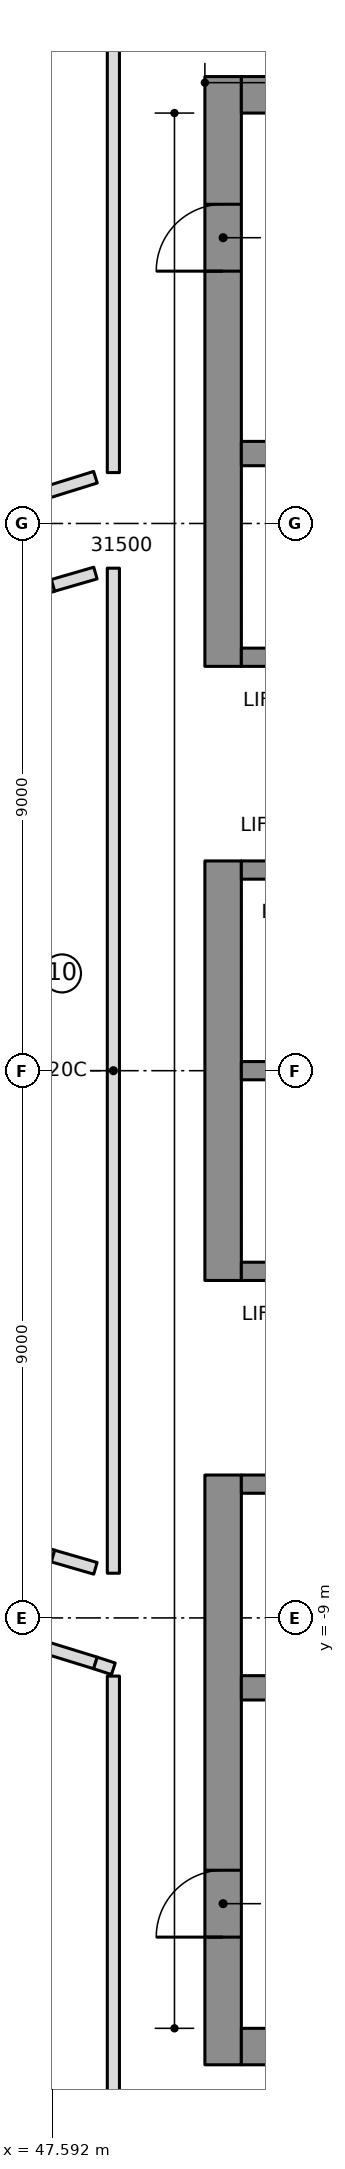
"""IFC4 building model, lengths in metres.
Left out: names, types, materials, properties, quantities, classifications, styles, units other than length and angle.
Written with IfcOpenShell. Run it as: python <this file> out.ifc"""

import sys

from ifc_helpers import new_model, si_unit, direction, frame, frame_2d, origin, place, context, subcontext, project, spatial, rectangle, extrude, element, fill, save


model = new_model("IFC4")
c1 = context("Model", 3, precision=1e-05, world=origin(), true_north=direction((0.0, 1.0)))
c2 = subcontext(c1, "Body", "Model", "MODEL_VIEW")
j1 = project(units=[si_unit("LENGTHUNIT", "METRE"), si_unit("PLANEANGLEUNIT", "RADIAN")], contexts=[c1])
p1 = place(None, origin())
s1 = spatial("IfcSite", under=j1, at=p1, CompositionType="ELEMENT")
p2 = place(p1, origin())
s2 = spatial("IfcBuilding", under=s1, at=p2, CompositionType="ELEMENT")
p3 = place(p2, frame((0.0, 0.0, 227.9)))
s3 = spatial("IfcBuildingStorey", under=s2, at=p3, CompositionType="ELEMENT", Elevation=227.9)
p4 = place(p3, frame((50.4, 6.65, 0.0), z_axis=(0.0, 0.0, 1.0), x_axis=(0.0, 1.0, 0.0)))
e1 = element("IfcWall", 1, at=p4, inside=s3, PredefinedType="SHEAR", context=c2, shape_type="SweptSolid", body=[
    extrude(rectangle(XDim=9.7, YDim=0.6, at=frame_2d((4.85, 0.0))), origin(), (0.0, 0.0, 1.0), 3.55),
])
p5 = place(p4, frame((6.5, 0.0, 0.0)))
e2 = element("IfcOpeningElement", 2, at=p5, cuts=e1, PredefinedType="OPENING", context=c2, shape_type="SweptSolid", body=[
    extrude(rectangle(XDim=1.1, YDim=2.1, at=frame_2d((0.55, 1.05))), frame((0.0, 0.31, 0.0), z_axis=(0.0, -1.0, 0.0), x_axis=(1.0, 0.0, 0.0)), (0.0, 0.0, 1.0), 0.62),
])
p6 = place(p3, frame((50.4, -3.45, 0.0), z_axis=(0.0, 0.0, 1.0), x_axis=(0.0, 1.0, 0.0)))
e3 = element("IfcWall", 3, at=p6, inside=s3, PredefinedType="SHEAR", context=c2, shape_type="SweptSolid", body=[
    extrude(rectangle(XDim=6.9, YDim=0.6, at=frame_2d((3.45, 0.0))), origin(), (0.0, 0.0, 1.0), 3.55),
])
p7 = place(p3, frame((50.4, -16.35, 0.0), z_axis=(0.0, 0.0, 1.0), x_axis=(0.0, 1.0, 0.0)))
e4 = element("IfcWall", 4, at=p7, inside=s3, PredefinedType="SHEAR", context=c2, shape_type="SweptSolid", body=[
    extrude(rectangle(XDim=9.7, YDim=0.6, at=frame_2d((4.85, 0.0))), origin(), (0.0, 0.0, 1.0), 3.55),
])
p8 = place(p7, frame((2.1, 0.0, 0.0)))
e5 = element("IfcOpeningElement", 5, at=p8, cuts=e4, PredefinedType="OPENING", context=c2, shape_type="SweptSolid", body=[
    extrude(rectangle(XDim=1.1, YDim=2.1, at=frame_2d((0.55, 1.05))), frame((0.0, 0.31, 0.0), z_axis=(0.0, -1.0, 0.0), x_axis=(1.0, 0.0, 0.0)), (0.0, 0.0, 1.0), 0.62),
])
for number, where, z_axis, x_axis in (
    (6, (50.7, 16.05, 0.0), (0.0, 0.0, 1.0), (1.0, 0.0, 0.0)),
    (7, (50.7, -16.05, 0.0), (0.0, 0.0, 1.0), (1.0, 0.0, 0.0)),
):
    element("IfcWall", number, at=place(p3, frame(where, z_axis=z_axis, x_axis=x_axis)), inside=s3, PredefinedType="SHEAR", context=c2, shape_type="SweptSolid", body=[
        extrude(rectangle(XDim=13.62, YDim=0.6, at=frame_2d((6.81, 0.0))), origin(), (0.0, 0.0, 1.0), 3.55),
    ])
p9 = place(p3, frame((50.7, 10.15, 0.0), z_axis=(0.0, 0.0, 1.0), x_axis=(1.0, 0.0, 0.0)))
e8 = element("IfcWall", 8, at=p9, inside=s3, PredefinedType="SHEAR", context=c2, shape_type="SweptSolid", body=[
    extrude(rectangle(XDim=13.02, YDim=0.4, at=frame_2d((6.51, 0.0))), origin(), (0.0, 0.0, 1.0), 3.55),
])
p10 = place(p9, frame((0.7, 0.0, 0.0)))
e9 = element("IfcOpeningElement", 9, at=p10, cuts=e8, PredefinedType="OPENING", context=c2, shape_type="SweptSolid", body=[
    extrude(rectangle(XDim=1.1, YDim=2.1, at=frame_2d((0.55, 1.05))), frame((0.0, 0.21, 0.0), z_axis=(0.0, -1.0, 0.0), x_axis=(1.0, 0.0, 0.0)), (0.0, 0.0, 1.0), 0.42),
])
p11 = place(p9, frame((3.5, 0.0, 0.0)))
e10 = element("IfcOpeningElement", 10, at=p11, cuts=e8, PredefinedType="OPENING", context=c2, shape_type="SweptSolid", body=[
    extrude(rectangle(XDim=1.1, YDim=2.1, at=frame_2d((0.55, 1.05))), frame((0.0, 0.21, 0.0), z_axis=(0.0, -1.0, 0.0), x_axis=(1.0, 0.0, 0.0)), (0.0, 0.0, 1.0), 0.42),
])
p12 = place(p3, frame((50.7, -10.15, 0.0), z_axis=(0.0, 0.0, 1.0), x_axis=(1.0, 0.0, 0.0)))
e11 = element("IfcWall", 11, at=p12, inside=s3, PredefinedType="SHEAR", context=c2, shape_type="SweptSolid", body=[
    extrude(rectangle(XDim=13.02, YDim=0.4, at=frame_2d((6.51, 0.0))), origin(), (0.0, 0.0, 1.0), 3.55),
])
p13 = place(p3, frame((50.7, 0.0, 0.0), z_axis=(0.0, 0.0, 1.0), x_axis=(1.0, 0.0, 0.0)))
e12 = element("IfcWall", 12, at=p13, inside=s3, PredefinedType="SHEAR", context=c2, shape_type="SweptSolid", body=[
    extrude(rectangle(XDim=10.9, YDim=0.3, at=frame_2d((5.45, 0.0))), origin(), (0.0, 0.0, 1.0), 3.55),
])
p14 = place(p3, frame((50.7, 3.3, 0.0), z_axis=(0.0, 0.0, 1.0), x_axis=(1.0, 0.0, 0.0)))
e13 = element("IfcWall", 13, at=p14, inside=s3, PredefinedType="SHEAR", context=c2, shape_type="SweptSolid", body=[
    extrude(rectangle(XDim=10.9, YDim=0.3, at=frame_2d((5.45, 0.0))), origin(), (0.0, 0.0, 1.0), 3.55),
])
p15 = place(p14, frame((0.7, 0.0, 0.0)))
e14 = element("IfcOpeningElement", 14, at=p15, cuts=e13, PredefinedType="OPENING", context=c2, shape_type="SweptSolid", body=[
    extrude(rectangle(XDim=1.1, YDim=2.1, at=frame_2d((0.55, 1.05))), frame((0.0, 0.16, 0.0), z_axis=(0.0, -1.0, 0.0), x_axis=(1.0, 0.0, 0.0)), (0.0, 0.0, 1.0), 0.32),
])
p16 = place(p14, frame((3.5, 0.0, 0.0)))
e15 = element("IfcOpeningElement", 15, at=p16, cuts=e13, PredefinedType="OPENING", context=c2, shape_type="SweptSolid", body=[
    extrude(rectangle(XDim=1.1, YDim=2.1, at=frame_2d((0.55, 1.05))), frame((0.0, 0.16, 0.0), z_axis=(0.0, -1.0, 0.0), x_axis=(1.0, 0.0, 0.0)), (0.0, 0.0, 1.0), 0.32),
])
p17 = place(p14, frame((6.4, 0.0, 0.0)))
e16 = element("IfcOpeningElement", 16, at=p17, cuts=e13, PredefinedType="OPENING", context=c2, shape_type="SweptSolid", body=[
    extrude(rectangle(XDim=0.9, YDim=2.1, at=frame_2d((0.45, 1.05))), frame((0.0, 0.16, 0.0), z_axis=(0.0, -1.0, 0.0), x_axis=(1.0, 0.0, 0.0)), (0.0, 0.0, 1.0), 0.32),
])
p18 = place(p14, frame((9.2, 0.0, 0.0)))
e17 = element("IfcOpeningElement", 17, at=p18, cuts=e13, PredefinedType="OPENING", context=c2, shape_type="SweptSolid", body=[
    extrude(rectangle(XDim=0.9, YDim=2.1, at=frame_2d((0.45, 1.05))), frame((0.0, 0.16, 0.0), z_axis=(0.0, -1.0, 0.0), x_axis=(1.0, 0.0, 0.0)), (0.0, 0.0, 1.0), 0.32),
])
p19 = place(p3, frame((50.7, 6.8, 0.0), z_axis=(0.0, 0.0, 1.0), x_axis=(1.0, 0.0, 0.0)))
e18 = element("IfcWall", 18, at=p19, inside=s3, PredefinedType="SHEAR", context=c2, shape_type="SweptSolid", body=[
    extrude(rectangle(XDim=10.9, YDim=0.3, at=frame_2d((5.45, 0.0))), origin(), (0.0, 0.0, 1.0), 3.55),
])
p20 = place(p19, frame((6.4, 0.0, 0.0)))
e19 = element("IfcOpeningElement", 19, at=p20, cuts=e18, PredefinedType="OPENING", context=c2, shape_type="SweptSolid", body=[
    extrude(rectangle(XDim=0.9, YDim=2.1, at=frame_2d((0.45, 1.05))), frame((0.0, 0.16, 0.0), z_axis=(0.0, -1.0, 0.0), x_axis=(1.0, 0.0, 0.0)), (0.0, 0.0, 1.0), 0.32),
])
p21 = place(p19, frame((9.2, 0.0, 0.0)))
e20 = element("IfcOpeningElement", 20, at=p21, cuts=e18, PredefinedType="OPENING", context=c2, shape_type="SweptSolid", body=[
    extrude(rectangle(XDim=0.9, YDim=2.1, at=frame_2d((0.45, 1.05))), frame((0.0, 0.16, 0.0), z_axis=(0.0, -1.0, 0.0), x_axis=(1.0, 0.0, 0.0)), (0.0, 0.0, 1.0), 0.32),
])
p22 = place(p3, frame((50.7, -3.3, 0.0), z_axis=(0.0, 0.0, 1.0), x_axis=(1.0, 0.0, 0.0)))
e21 = element("IfcWall", 21, at=p22, inside=s3, PredefinedType="SHEAR", context=c2, shape_type="SweptSolid", body=[
    extrude(rectangle(XDim=10.9, YDim=0.3, at=frame_2d((5.45, 0.0))), origin(), (0.0, 0.0, 1.0), 3.55),
])
p23 = place(p22, frame((9.1, 0.0, 0.0)))
e22 = element("IfcOpeningElement", 22, at=p23, cuts=e21, PredefinedType="OPENING", context=c2, shape_type="SweptSolid", body=[
    extrude(rectangle(XDim=1.1, YDim=2.1, at=frame_2d((0.55, 1.05))), frame((0.0, 0.16, 0.0), z_axis=(0.0, -1.0, 0.0), x_axis=(1.0, 0.0, 0.0)), (0.0, 0.0, 1.0), 0.32),
])
p24 = place(p3, frame((50.7, -6.8, 0.0), z_axis=(0.0, 0.0, 1.0), x_axis=(1.0, 0.0, 0.0)))
e23 = element("IfcWall", 23, at=p24, inside=s3, PredefinedType="SHEAR", context=c2, shape_type="SweptSolid", body=[
    extrude(rectangle(XDim=10.9, YDim=0.3, at=frame_2d((5.45, 0.0))), origin(), (0.0, 0.0, 1.0), 3.55),
])
p25 = place(p24, frame((6.3, 0.0, 0.0)))
e24 = element("IfcOpeningElement", 24, at=p25, cuts=e23, PredefinedType="OPENING", context=c2, shape_type="SweptSolid", body=[
    extrude(rectangle(XDim=1.1, YDim=2.1, at=frame_2d((0.55, 1.05))), frame((0.0, 0.16, 0.0), z_axis=(0.0, -1.0, 0.0), x_axis=(1.0, 0.0, 0.0)), (0.0, 0.0, 1.0), 0.32),
])
p26 = place(p24, frame((9.1, 0.0, 0.0)))
e25 = element("IfcOpeningElement", 25, at=p26, cuts=e23, PredefinedType="OPENING", context=c2, shape_type="SweptSolid", body=[
    extrude(rectangle(XDim=1.1, YDim=2.1, at=frame_2d((0.55, 1.05))), frame((0.0, 0.16, 0.0), z_axis=(0.0, -1.0, 0.0), x_axis=(1.0, 0.0, 0.0)), (0.0, 0.0, 1.0), 0.32),
])
p27 = place(p24, frame((0.8, 0.0, 0.0)))
e26 = element("IfcOpeningElement", 26, at=p27, cuts=e23, PredefinedType="OPENING", context=c2, shape_type="SweptSolid", body=[
    extrude(rectangle(XDim=0.9, YDim=2.1, at=frame_2d((0.45, 1.05))), frame((0.0, 0.16, 0.0), z_axis=(0.0, -1.0, 0.0), x_axis=(1.0, 0.0, 0.0)), (0.0, 0.0, 1.0), 0.32),
])
p28 = place(p24, frame((3.6, 0.0, 0.0)))
e27 = element("IfcOpeningElement", 27, at=p28, cuts=e23, PredefinedType="OPENING", context=c2, shape_type="SweptSolid", body=[
    extrude(rectangle(XDim=0.9, YDim=2.1, at=frame_2d((0.45, 1.05))), frame((0.0, 0.16, 0.0), z_axis=(0.0, -1.0, 0.0), x_axis=(1.0, 0.0, 0.0)), (0.0, 0.0, 1.0), 0.32),
])
for number, where, z_axis, x_axis in (
    (28, (46.85, 7.748, 0.0), (0.0, 0.0, 1.0), (0.955, 0.298, 0.0)),
    (29, (47.602, -7.982, 0.0), (0.0, 0.0, 1.0), (-0.955, 0.298, 0.0)),
):
    element("IfcWall", number, at=place(p3, frame(where, z_axis=z_axis, x_axis=x_axis)), inside=s3, PredefinedType="PARTITIONING", context=c2, shape_type="SweptSolid", body=[
        extrude(rectangle(XDim=0.788, YDim=0.2, at=frame_2d((0.394, 0.0))), origin(), (0.0, 0.0, 1.0), 3.25),
    ])
p29 = place(p3, frame((41.898, 7.764, 0.0), z_axis=(0.0, 0.0, 1.0), x_axis=(0.954667015156, 0.297675813886, 0.0)))
e30 = element("IfcWall", 30, at=p29, inside=s3, PredefinedType="PARTITIONING", context=c2, shape_type="SweptSolid", body=[
    extrude(rectangle(XDim=6.706, YDim=0.2, at=frame_2d((3.353, 0.0))), origin(), (0.0, 0.0, 1.0), 3.25),
])
p30 = place(p29, frame((3.95, 0.0, 0.0)))
e31 = element("IfcOpeningElement", 31, at=p30, cuts=e30, PredefinedType="OPENING", context=c2, shape_type="SweptSolid", body=[
    extrude(rectangle(XDim=1.5, YDim=2.1, at=frame_2d((0.75, 1.05))), frame((0.0, 0.11, 0.0), z_axis=(0.0, -1.0, 0.0), x_axis=(1.0, 0.0, 0.0)), (0.0, 0.0, 1.0), 0.22),
])
p31 = place(p3, frame((41.898, -7.764, 0.0), z_axis=(0.0, 0.0, 1.0), x_axis=(0.955502033518, -0.294984514752, 0.0)))
e32 = element("IfcWall", 32, at=p31, inside=s3, PredefinedType="PARTITIONING", context=c2, shape_type="SweptSolid", body=[
    extrude(rectangle(XDim=6.7, YDim=0.2, at=frame_2d((3.35, 0.0))), origin(), (0.0, 0.0, 1.0), 3.25),
])
p32 = place(p31, frame((3.95, 0.0, 0.0)))
e33 = element("IfcOpeningElement", 33, at=p32, cuts=e32, PredefinedType="OPENING", context=c2, shape_type="SweptSolid", body=[
    extrude(rectangle(XDim=1.5, YDim=2.1, at=frame_2d((0.75, 1.05))), frame((0.0, 0.11, 0.0), z_axis=(0.0, -1.0, 0.0), x_axis=(1.0, 0.0, 0.0)), (0.0, 0.0, 1.0), 0.22),
])
for number, where, z_axis, x_axis in (
    (34, (47.602, 7.982, 0.0), (0.0, 0.0, 1.0), (0.96, 0.278, 0.0)),
    (35, (48.3, -8.185, 0.0), (0.0, 0.0, 1.0), (-0.96, 0.278, 0.0)),
):
    element("IfcWall", number, at=place(p3, frame(where, z_axis=z_axis, x_axis=x_axis)), inside=s3, PredefinedType="PARTITIONING", context=c2, shape_type="SweptSolid", body=[
        extrude(rectangle(XDim=0.727, YDim=0.2, at=frame_2d((0.363, 0.0))), origin(), (0.0, 0.0, 1.0), 3.25),
    ])
p33 = place(p3, frame((48.595, 8.265, 0.0), z_axis=(0.0, 0.0, 1.0), x_axis=(0.0, -1.0, 0.0)))
e36 = element("IfcWall", 36, at=p33, inside=s3, PredefinedType="PARTITIONING", context=c2, shape_type="SweptSolid", body=[
    extrude(rectangle(XDim=16.53, YDim=0.2, at=frame_2d((8.265, 0.0))), origin(), (0.0, 0.0, 1.0), 3.25),
])
p34 = place(p3, frame((48.595, 19.904, 0.0), z_axis=(0.0, 0.0, 1.0), x_axis=(0.0, -1.0, 0.0)))
e37 = element("IfcWall", 37, at=p34, inside=s3, PredefinedType="PARTITIONING", context=c2, shape_type="SweptSolid", body=[
    extrude(rectangle(XDim=10.067, YDim=0.2, at=frame_2d((5.034, 0.0))), origin(), (0.0, 0.0, 1.0), 3.25),
])
p35 = place(p3, frame((48.3, -9.741, 0.0), z_axis=(0.0, 0.0, 1.0), x_axis=(0.950709666312, -0.31008245739, 0.0)))
e38 = element("IfcWall", 38, at=p35, inside=s3, PredefinedType="PARTITIONING", context=c2, shape_type="SweptSolid", body=[
    extrude(rectangle(XDim=0.31, YDim=0.2, at=frame_2d((0.155, 0.0))), origin(), (0.0, 0.0, 1.0), 3.25),
])
p36 = place(p3, frame((48.595, -9.957, 0.0), z_axis=(0.0, 0.0, 1.0), x_axis=(0.0, -1.0, 0.0)))
e39 = element("IfcWall", 39, at=p36, inside=s3, PredefinedType="PARTITIONING", context=c2, shape_type="SweptSolid", body=[
    extrude(rectangle(XDim=9.947, YDim=0.2, at=frame_2d((4.974, 0.0))), origin(), (0.0, 0.0, 1.0), 3.25),
])
p37 = place(p5, origin())
e40 = element("IfcDoor", 40, at=p37, inside=s3, OperationType="SINGLE_SWING_RIGHT", PredefinedType="DOOR", context=c2, shape_type="SweptSolid", body=[
    extrude(rectangle(XDim=1.1, YDim=2.1, at=frame_2d((0.55, 1.05))), frame((0.0, 0.025, 0.0), z_axis=(0.0, -1.0, 0.0), x_axis=(1.0, 0.0, 0.0)), (0.0, 0.0, 1.0), 0.05),
])
fill(e2, e40)
p38 = place(p8, origin())
e41 = element("IfcDoor", 41, at=p38, inside=s3, OperationType="SINGLE_SWING_RIGHT", PredefinedType="DOOR", context=c2, shape_type="SweptSolid", body=[
    extrude(rectangle(XDim=1.1, YDim=2.1, at=frame_2d((0.55, 1.05))), frame((0.0, 0.025, 0.0), z_axis=(0.0, -1.0, 0.0), x_axis=(1.0, 0.0, 0.0)), (0.0, 0.0, 1.0), 0.05),
])
fill(e5, e41)
save(model, sys.argv[1])
